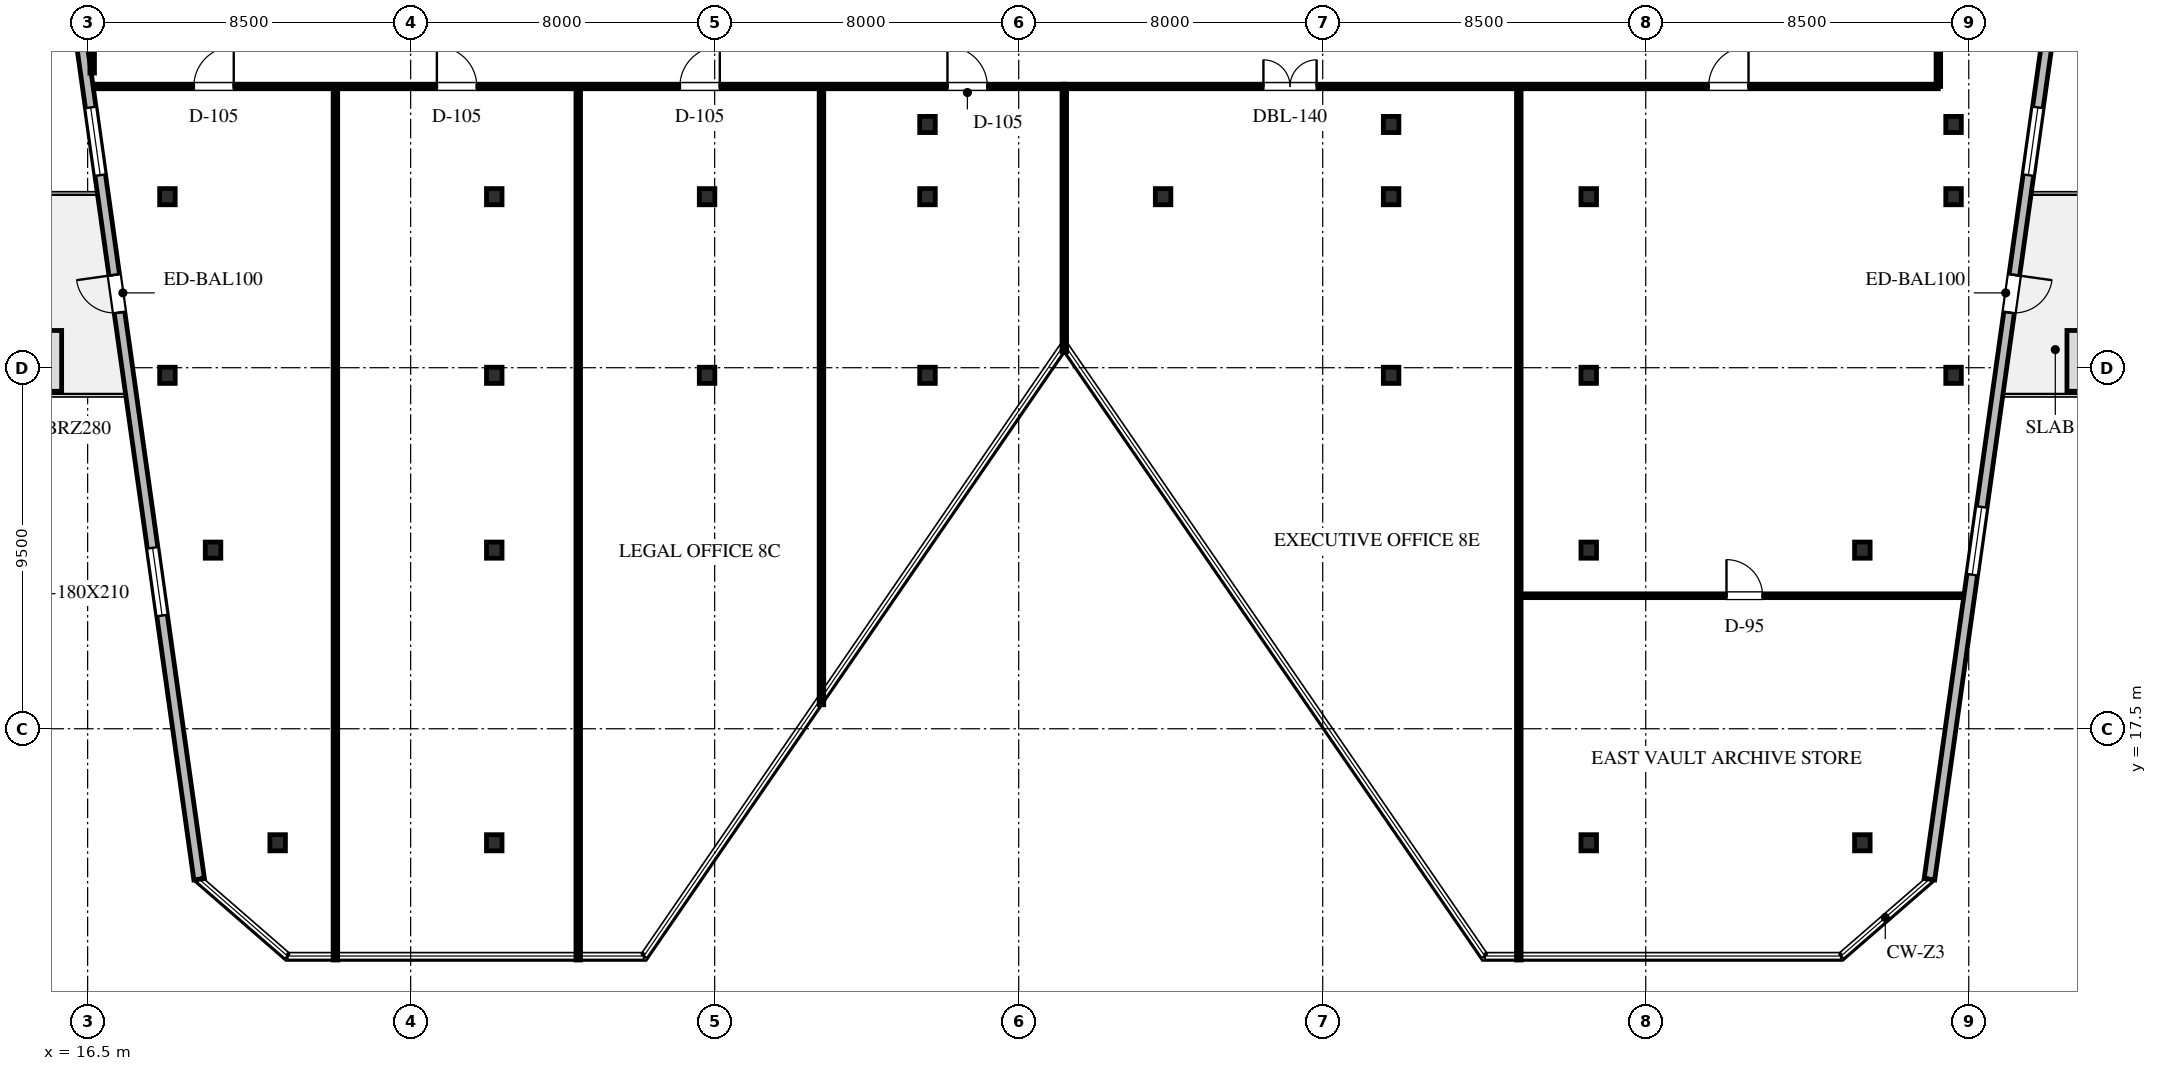
"""IFC4 building model, lengths in metres.
Left out: names, types, materials, properties, quantities, classifications, styles, units other than length and angle.
Written with IfcOpenShell. Run it as: python <this file> out.ifc"""

import sys

from ifc_helpers import new_model, si_unit, direction, frame, frame_2d, origin, origin_2d, place, context, subcontext, project, spatial, rectangle, i_section, extrude, element, fill, save


model = new_model("IFC4")
c1 = context("Model", 3, precision=1e-05, world=origin(), true_north=direction((0.0, 1.0)))
c2 = subcontext(c1, "Body", "Model", "MODEL_VIEW")
j1 = project(units=[si_unit("LENGTHUNIT", "METRE"), si_unit("PLANEANGLEUNIT", "RADIAN")], contexts=[c1])
p1 = place(None, origin())
s1 = spatial("IfcSite", under=j1, at=p1, CompositionType="ELEMENT")
p2 = place(p1, origin())
s2 = spatial("IfcBuilding", under=s1, at=p2, CompositionType="ELEMENT")
p3 = place(p2, frame((0.0, 0.0, 168.5)))
s3 = spatial("IfcBuildingStorey", under=s2, at=p3, CompositionType="ELEMENT", Elevation=168.5)
for number, where, z_axis, x_axis in (
    (1, (21.5, 14.5, 0.0), (0.0, 0.0, 1.0), (1.0, 0.0, 0.0)),
    (2, (18.6, 26.8, 0.0), (0.0, 0.0, 1.0), (1.0, 0.0, 0.0)),
    (3, (27.2, 26.8, 0.0), (0.0, 0.0, 1.0), (1.0, 0.0, 0.0)),
    (4, (32.8, 26.8, 0.0), (0.0, 0.0, 1.0), (1.0, 0.0, 0.0)),
    (5, (38.6, 26.8, 0.0), (0.0, 0.0, 1.0), (1.0, 0.0, 0.0)),
    (6, (50.8, 26.8, 0.0), (0.0, 0.0, 1.0), (1.0, 0.0, 0.0)),
    (7, (56.0, 26.8, 0.0), (0.0, 0.0, 1.0), (1.0, 0.0, 0.0)),
    (8, (65.6, 26.8, 0.0), (0.0, 0.0, 1.0), (1.0, 0.0, 0.0)),
    (9, (18.6, 31.5, 0.0), (0.0, 0.0, 1.0), (1.0, 0.0, 0.0)),
    (10, (27.2, 31.5, 0.0), (0.0, 0.0, 1.0), (1.0, 0.0, 0.0)),
    (11, (32.8, 31.5, 0.0), (0.0, 0.0, 1.0), (1.0, 0.0, 0.0)),
    (12, (27.2, 14.5, 0.0), (0.0, 0.0, 1.0), (1.0, 0.0, 0.0)),
    (13, (38.6, 31.5, 0.0), (0.0, 0.0, 1.0), (1.0, 0.0, 0.0)),
    (14, (44.8, 31.5, 0.0), (0.0, 0.0, 1.0), (1.0, 0.0, 0.0)),
    (15, (50.8, 31.5, 0.0), (0.0, 0.0, 1.0), (1.0, 0.0, 0.0)),
    (16, (56.0, 31.5, 0.0), (0.0, 0.0, 1.0), (1.0, 0.0, 0.0)),
    (17, (65.6, 31.5, 0.0), (0.0, 0.0, 1.0), (1.0, 0.0, 0.0)),
    (18, (56.0, 14.5, 0.0), (0.0, 0.0, 1.0), (1.0, 0.0, 0.0)),
    (19, (63.2, 14.5, 0.0), (0.0, 0.0, 1.0), (1.0, 0.0, 0.0)),
    (20, (19.8, 22.2, 0.0), (0.0, 0.0, 1.0), (1.0, 0.0, 0.0)),
    (21, (27.2, 22.2, 0.0), (0.0, 0.0, 1.0), (1.0, 0.0, 0.0)),
    (22, (56.0, 22.2, 0.0), (0.0, 0.0, 1.0), (1.0, 0.0, 0.0)),
    (23, (63.2, 22.2, 0.0), (0.0, 0.0, 1.0), (1.0, 0.0, 0.0)),
    (24, (38.6, 33.4, 0.0), (0.0, 0.0, 1.0), (1.0, 0.0, 0.0)),
    (25, (50.8, 33.4, 0.0), (0.0, 0.0, 1.0), (1.0, 0.0, 0.0)),
    (26, (65.6, 33.4, 0.0), (0.0, 0.0, 1.0), (1.0, 0.0, 0.0)),
):
    element("IfcColumn", number, at=place(p3, frame(where, z_axis=z_axis, x_axis=x_axis)), inside=s3, PredefinedType="COLUMN", context=c2, shape_type="SweptSolid", body=[
        extrude(i_section(OverallWidth=0.409, OverallDepth=0.425, WebThickness=0.033, FlangeThickness=0.052, FilletRadius=0.03, at=origin_2d()), origin(), (0.0, 0.0, 1.0), 4.0),
    ])
p4 = place(p3, frame((19.434, 13.541, 0.0), z_axis=(0.0, 0.0, 1.0), x_axis=(-0.139173290738, 0.99026804207, 0.0)))
e27 = element("IfcWall", 27, at=p4, inside=s3, PredefinedType="STANDARD", context=c2, shape_type="SweptSolid", body=[
    extrude(rectangle(XDim=24.498, YDim=0.28, at=frame_2d((12.249, 0.0))), origin(), (0.0, 0.0, 1.0), 3.755),
])
p5 = place(p4, frame((15.057, 0.0, 0.0)))
e28 = element("IfcOpeningElement", 28, at=p5, cuts=e27, PredefinedType="OPENING", context=c2, shape_type="SweptSolid", body=[
    extrude(rectangle(XDim=1.0, YDim=2.15, at=frame_2d((0.5, 1.075))), frame((0.0, 0.15, 0.0), z_axis=(0.0, -1.0, 0.0), x_axis=(1.0, 0.0, 0.0)), (0.0, 0.0, 1.0), 0.3),
])
p6 = place(p4, frame((7.006, 0.0, 0.65)))
e29 = element("IfcOpeningElement", 29, at=p6, cuts=e27, PredefinedType="OPENING", context=c2, shape_type="SweptSolid", body=[
    extrude(rectangle(XDim=1.8, YDim=2.1, at=frame_2d((0.9, 1.05))), frame((0.0, 0.15, 0.0), z_axis=(0.0, -1.0, 0.0), x_axis=(1.0, 0.0, 0.0)), (0.0, 0.0, 1.0), 0.3),
])
p7 = place(p4, frame((18.708, 0.0, 0.65)))
e30 = element("IfcOpeningElement", 30, at=p7, cuts=e27, PredefinedType="OPENING", context=c2, shape_type="SweptSolid", body=[
    extrude(rectangle(XDim=1.8, YDim=2.1, at=frame_2d((0.9, 1.05))), frame((0.0, 0.15, 0.0), z_axis=(0.0, -1.0, 0.0), x_axis=(1.0, 0.0, 0.0)), (0.0, 0.0, 1.0), 0.3),
])
p8 = place(p3, frame((68.375, 37.8, 0.0), z_axis=(0.0, 0.0, 1.0), x_axis=(-0.139173290738, -0.99026804207, 0.0)))
e31 = element("IfcWall", 31, at=p8, inside=s3, PredefinedType="STANDARD", context=c2, shape_type="SweptSolid", body=[
    extrude(rectangle(XDim=24.498, YDim=0.28, at=frame_2d((12.249, 0.0))), origin(), (0.0, 0.0, 1.0), 3.755),
])
p9 = place(p8, frame((8.44, 0.0, 0.0)))
e32 = element("IfcOpeningElement", 32, at=p9, cuts=e31, PredefinedType="OPENING", context=c2, shape_type="SweptSolid", body=[
    extrude(rectangle(XDim=1.0, YDim=2.15, at=frame_2d((0.5, 1.075))), frame((0.0, 0.15, 0.0), z_axis=(0.0, -1.0, 0.0), x_axis=(1.0, 0.0, 0.0)), (0.0, 0.0, 1.0), 0.3),
])
p10 = place(p8, frame((3.99, 0.0, 0.65)))
e33 = element("IfcOpeningElement", 33, at=p10, cuts=e31, PredefinedType="OPENING", context=c2, shape_type="SweptSolid", body=[
    extrude(rectangle(XDim=1.8, YDim=2.1, at=frame_2d((0.9, 1.05))), frame((0.0, 0.15, 0.0), z_axis=(0.0, -1.0, 0.0), x_axis=(1.0, 0.0, 0.0)), (0.0, 0.0, 1.0), 0.3),
])
p11 = place(p8, frame((14.606, 0.0, 0.65)))
e34 = element("IfcOpeningElement", 34, at=p11, cuts=e31, PredefinedType="OPENING", context=c2, shape_type="SweptSolid", body=[
    extrude(rectangle(XDim=1.8, YDim=2.1, at=frame_2d((0.9, 1.05))), frame((0.0, 0.15, 0.0), z_axis=(0.0, -1.0, 0.0), x_axis=(1.0, 0.0, 0.0)), (0.0, 0.0, 1.0), 0.3),
])
p12 = place(p3, frame((16.669, 34.4, 0.0), z_axis=(0.0, 0.0, 1.0), x_axis=(1.0, 0.0, 0.0)))
e35 = element("IfcWall", 35, at=p12, inside=s3, PredefinedType="PARTITIONING", context=c2, shape_type="SweptSolid", body=[
    extrude(rectangle(XDim=25.531, YDim=0.12, at=frame_2d((12.765, 0.0))), origin(), (0.0, 0.0, 1.0), 2.982),
])
p13 = place(p12, frame((2.625, 0.0, 0.0)))
e36 = element("IfcOpeningElement", 36, at=p13, cuts=e35, PredefinedType="OPENING", context=c2, shape_type="SweptSolid", body=[
    extrude(rectangle(XDim=1.05, YDim=2.2, at=frame_2d((0.525, 1.1))), frame((0.0, 0.07, 0.0), z_axis=(0.0, -1.0, 0.0), x_axis=(1.0, 0.0, 0.0)), (0.0, 0.0, 1.0), 0.14),
])
p14 = place(p12, frame((9.021, 0.0, 0.0)))
e37 = element("IfcOpeningElement", 37, at=p14, cuts=e35, PredefinedType="OPENING", context=c2, shape_type="SweptSolid", body=[
    extrude(rectangle(XDim=1.05, YDim=2.2, at=frame_2d((0.525, 1.1))), frame((0.0, 0.07, 0.0), z_axis=(0.0, -1.0, 0.0), x_axis=(1.0, 0.0, 0.0)), (0.0, 0.0, 1.0), 0.14),
])
p15 = place(p12, frame((15.416, 0.0, 0.0)))
e38 = element("IfcOpeningElement", 38, at=p15, cuts=e35, PredefinedType="OPENING", context=c2, shape_type="SweptSolid", body=[
    extrude(rectangle(XDim=1.05, YDim=2.2, at=frame_2d((0.525, 1.1))), frame((0.0, 0.07, 0.0), z_axis=(0.0, -1.0, 0.0), x_axis=(1.0, 0.0, 0.0)), (0.0, 0.0, 1.0), 0.14),
])
p16 = place(p12, frame((22.456, 0.0, 0.0)))
e39 = element("IfcOpeningElement", 39, at=p16, cuts=e35, PredefinedType="OPENING", context=c2, shape_type="SweptSolid", body=[
    extrude(rectangle(XDim=1.05, YDim=2.2, at=frame_2d((0.525, 1.1))), frame((0.0, 0.07, 0.0), z_axis=(0.0, -1.0, 0.0), x_axis=(1.0, 0.0, 0.0)), (0.0, 0.0, 1.0), 0.14),
])
p17 = place(p3, frame((42.2, 34.4, 0.0), z_axis=(0.0, 0.0, 1.0), x_axis=(1.0, 0.0, 0.0)))
e40 = element("IfcWall", 40, at=p17, inside=s3, PredefinedType="PARTITIONING", context=c2, shape_type="SweptSolid", body=[
    extrude(rectangle(XDim=23.0, YDim=0.12, at=frame_2d((11.5, 0.0))), origin(), (0.0, 0.0, 1.0), 2.982),
])
p18 = place(p17, frame((5.24, 0.0, 0.0)))
e41 = element("IfcOpeningElement", 41, at=p18, cuts=e40, PredefinedType="OPENING", context=c2, shape_type="SweptSolid", body=[
    extrude(rectangle(XDim=1.4, YDim=2.2, at=frame_2d((0.7, 1.1))), frame((0.0, 0.07, 0.0), z_axis=(0.0, -1.0, 0.0), x_axis=(1.0, 0.0, 0.0)), (0.0, 0.0, 1.0), 0.14),
])
p19 = place(p17, frame((16.955, 0.0, 0.0)))
e42 = element("IfcOpeningElement", 42, at=p19, cuts=e40, PredefinedType="OPENING", context=c2, shape_type="SweptSolid", body=[
    extrude(rectangle(XDim=1.05, YDim=2.2, at=frame_2d((0.525, 1.1))), frame((0.0, 0.07, 0.0), z_axis=(0.0, -1.0, 0.0), x_axis=(1.0, 0.0, 0.0)), (0.0, 0.0, 1.0), 0.14),
])
p20 = place(p3, frame((16.62, 34.752, 0.0), z_axis=(0.0, 0.0, 1.0), x_axis=(0.0, 1.0, 0.0)))
e43 = element("IfcWall", 43, at=p20, inside=s3, PredefinedType="PARTITIONING", context=c2, shape_type="SweptSolid", body=[
    extrude(rectangle(XDim=3.298, YDim=0.12, at=frame_2d((1.649, 0.0))), origin(), (0.0, 0.0, 1.0), 3.755),
])
p21 = place(p3, frame((65.2, 34.4, 0.0), z_axis=(0.0, 0.0, 1.0), x_axis=(0.0, 1.0, 0.0)))
e44 = element("IfcWall", 44, at=p21, inside=s3, PredefinedType="PARTITIONING", context=c2, shape_type="SweptSolid", body=[
    extrude(rectangle(XDim=3.317, YDim=0.12, at=frame_2d((1.659, 0.0))), origin(), (0.0, 0.0, 1.0), 2.982),
])
p22 = place(p3, frame((42.2, 27.427, 0.0), z_axis=(0.0, 0.0, 1.0), x_axis=(0.0, 1.0, 0.0)))
e45 = element("IfcWall", 45, at=p22, inside=s3, PredefinedType="PARTITIONING", context=c2, shape_type="SweptSolid", body=[
    extrude(rectangle(XDim=6.973, YDim=0.12, at=frame_2d((3.487, 0.0))), origin(), (0.0, 0.0, 1.0), 2.982),
])
for number, where, z_axis, x_axis in (
    (46, (23.02, 11.415, 0.0), (0.0, 0.0, 1.0), (0.0, 1.0, 0.0)),
    (47, (29.41, 11.415, 0.0), (0.0, 0.0, 1.0), (0.0, 1.0, 0.0)),
):
    element("IfcWall", number, at=place(p3, frame(where, z_axis=z_axis, x_axis=x_axis)), inside=s3, PredefinedType="PARTITIONING", context=c2, shape_type="SweptSolid", body=[
        extrude(rectangle(XDim=22.917, YDim=0.12, at=frame_2d((11.458, 0.0))), origin(), (0.0, 0.0, 1.0), 2.982),
    ])
p23 = place(p3, frame((35.81, 18.132, 0.0), z_axis=(0.0, 0.0, 1.0), x_axis=(0.0, 1.0, 0.0)))
e48 = element("IfcWall", 48, at=p23, inside=s3, PredefinedType="PARTITIONING", context=c2, shape_type="SweptSolid", body=[
    extrude(rectangle(XDim=16.2, YDim=0.12, at=frame_2d((8.1, 0.0))), origin(), (0.0, 0.0, 1.0), 2.982),
])
p24 = place(p3, frame((54.16, 11.415, 0.0), z_axis=(0.0, 0.0, 1.0), x_axis=(0.0, 1.0, 0.0)))
e49 = element("IfcWall", 49, at=p24, inside=s3, PredefinedType="PARTITIONING", context=c2, shape_type="SweptSolid", body=[
    extrude(rectangle(XDim=22.917, YDim=0.12, at=frame_2d((11.458, 0.0))), origin(), (0.0, 0.0, 1.0), 2.982),
])
p25 = place(p3, frame((54.228, 21.0, 0.0), z_axis=(0.0, 0.0, 1.0), x_axis=(1.0, 0.0, 0.0)))
e50 = element("IfcWall", 50, at=p25, inside=s3, PredefinedType="PARTITIONING", context=c2, shape_type="SweptSolid", body=[
    extrude(rectangle(XDim=11.619, YDim=0.1, at=frame_2d((5.81, 0.0))), origin(), (0.0, 0.0, 1.0), 2.982),
])
p26 = place(p25, frame((5.397, 0.0, 0.0)))
e51 = element("IfcOpeningElement", 51, at=p26, cuts=e50, PredefinedType="OPENING", context=c2, shape_type="SweptSolid", body=[
    extrude(rectangle(XDim=0.95, YDim=2.15, at=frame_2d((0.475, 1.075))), frame((0.0, 0.06, 0.0), z_axis=(0.0, -1.0, 0.0), x_axis=(1.0, 0.0, 0.0)), (0.0, 0.0, 1.0), 0.12),
])
p27 = place(p5, origin())
e52 = element("IfcDoor", 52, at=p27, inside=s3, OperationType="SINGLE_SWING_RIGHT", PredefinedType="DOOR", context=c2, shape_type="SweptSolid", body=[
    extrude(rectangle(XDim=1.0, YDim=2.15, at=frame_2d((0.5, 1.075))), frame((0.0, 0.025, 0.0), z_axis=(0.0, -1.0, 0.0), x_axis=(1.0, 0.0, 0.0)), (0.0, 0.0, 1.0), 0.05),
])
fill(e28, e52)
p28 = place(p6, origin())
e53 = element("IfcWindow", 53, at=p28, inside=s3, PartitioningType="SINGLE_PANEL", PredefinedType="WINDOW", context=c2, shape_type="SweptSolid", body=[
    extrude(rectangle(XDim=1.8, YDim=2.1, at=frame_2d((0.9, 1.05))), frame((0.0, 0.03, 0.0), z_axis=(0.0, -1.0, 0.0), x_axis=(1.0, 0.0, 0.0)), (0.0, 0.0, 1.0), 0.06),
])
fill(e29, e53)
p29 = place(p7, origin())
e54 = element("IfcWindow", 54, at=p29, inside=s3, PartitioningType="SINGLE_PANEL", PredefinedType="WINDOW", context=c2, shape_type="SweptSolid", body=[
    extrude(rectangle(XDim=1.8, YDim=2.1, at=frame_2d((0.9, 1.05))), frame((0.0, 0.03, 0.0), z_axis=(0.0, -1.0, 0.0), x_axis=(1.0, 0.0, 0.0)), (0.0, 0.0, 1.0), 0.06),
])
fill(e30, e54)
p30 = place(p9, origin())
e55 = element("IfcDoor", 55, at=p30, inside=s3, OperationType="SINGLE_SWING_LEFT", PredefinedType="DOOR", context=c2, shape_type="SweptSolid", body=[
    extrude(rectangle(XDim=1.0, YDim=2.15, at=frame_2d((0.5, 1.075))), frame((0.0, 0.025, 0.0), z_axis=(0.0, -1.0, 0.0), x_axis=(1.0, 0.0, 0.0)), (0.0, 0.0, 1.0), 0.05),
])
fill(e32, e55)
p31 = place(p10, origin())
e56 = element("IfcWindow", 56, at=p31, inside=s3, PartitioningType="SINGLE_PANEL", PredefinedType="WINDOW", context=c2, shape_type="SweptSolid", body=[
    extrude(rectangle(XDim=1.8, YDim=2.1, at=frame_2d((0.9, 1.05))), frame((0.0, 0.03, 0.0), z_axis=(0.0, -1.0, 0.0), x_axis=(1.0, 0.0, 0.0)), (0.0, 0.0, 1.0), 0.06),
])
fill(e33, e56)
p32 = place(p11, origin())
e57 = element("IfcWindow", 57, at=p32, inside=s3, PartitioningType="SINGLE_PANEL", PredefinedType="WINDOW", context=c2, shape_type="SweptSolid", body=[
    extrude(rectangle(XDim=1.8, YDim=2.1, at=frame_2d((0.9, 1.05))), frame((0.0, 0.03, 0.0), z_axis=(0.0, -1.0, 0.0), x_axis=(1.0, 0.0, 0.0)), (0.0, 0.0, 1.0), 0.06),
])
fill(e34, e57)
p33 = place(p13, origin())
e58 = element("IfcDoor", 58, at=p33, inside=s3, OperationType="SINGLE_SWING_RIGHT", PredefinedType="DOOR", context=c2, shape_type="SweptSolid", body=[
    extrude(rectangle(XDim=1.05, YDim=2.2, at=frame_2d((0.525, 1.1))), frame((0.0, 0.025, 0.0), z_axis=(0.0, -1.0, 0.0), x_axis=(1.0, 0.0, 0.0)), (0.0, 0.0, 1.0), 0.05),
])
fill(e36, e58)
p34 = place(p14, origin())
e59 = element("IfcDoor", 59, at=p34, inside=s3, OperationType="SINGLE_SWING_LEFT", PredefinedType="DOOR", context=c2, shape_type="SweptSolid", body=[
    extrude(rectangle(XDim=1.05, YDim=2.2, at=frame_2d((0.525, 1.1))), frame((0.0, 0.025, 0.0), z_axis=(0.0, -1.0, 0.0), x_axis=(1.0, 0.0, 0.0)), (0.0, 0.0, 1.0), 0.05),
])
fill(e37, e59)
p35 = place(p15, origin())
e60 = element("IfcDoor", 60, at=p35, inside=s3, OperationType="SINGLE_SWING_RIGHT", PredefinedType="DOOR", context=c2, shape_type="SweptSolid", body=[
    extrude(rectangle(XDim=1.05, YDim=2.2, at=frame_2d((0.525, 1.1))), frame((0.0, 0.025, 0.0), z_axis=(0.0, -1.0, 0.0), x_axis=(1.0, 0.0, 0.0)), (0.0, 0.0, 1.0), 0.05),
])
fill(e38, e60)
p36 = place(p16, origin())
e61 = element("IfcDoor", 61, at=p36, inside=s3, OperationType="SINGLE_SWING_LEFT", PredefinedType="DOOR", context=c2, shape_type="SweptSolid", body=[
    extrude(rectangle(XDim=1.05, YDim=2.2, at=frame_2d((0.525, 1.1))), frame((0.0, 0.025, 0.0), z_axis=(0.0, -1.0, 0.0), x_axis=(1.0, 0.0, 0.0)), (0.0, 0.0, 1.0), 0.05),
])
fill(e39, e61)
p37 = place(p18, origin())
e62 = element("IfcDoor", 62, at=p37, inside=s3, OperationType="DOUBLE_DOOR_SINGLE_SWING", PredefinedType="DOOR", context=c2, shape_type="SweptSolid", body=[
    extrude(rectangle(XDim=1.4, YDim=2.2, at=frame_2d((0.7, 1.1))), frame((0.0, 0.025, 0.0), z_axis=(0.0, -1.0, 0.0), x_axis=(1.0, 0.0, 0.0)), (0.0, 0.0, 1.0), 0.05),
])
fill(e41, e62)
p38 = place(p19, origin())
e63 = element("IfcDoor", 63, at=p38, inside=s3, OperationType="SINGLE_SWING_RIGHT", PredefinedType="DOOR", context=c2, shape_type="SweptSolid", body=[
    extrude(rectangle(XDim=1.05, YDim=2.2, at=frame_2d((0.525, 1.1))), frame((0.0, 0.025, 0.0), z_axis=(0.0, -1.0, 0.0), x_axis=(1.0, 0.0, 0.0)), (0.0, 0.0, 1.0), 0.05),
])
fill(e42, e63)
p39 = place(p26, origin())
e64 = element("IfcDoor", 64, at=p39, inside=s3, OperationType="SINGLE_SWING_LEFT", PredefinedType="DOOR", context=c2, shape_type="SweptSolid", body=[
    extrude(rectangle(XDim=0.95, YDim=2.15, at=frame_2d((0.475, 1.075))), frame((0.0, 0.025, 0.0), z_axis=(0.0, -1.0, 0.0), x_axis=(1.0, 0.0, 0.0)), (0.0, 0.0, 1.0), 0.05),
])
fill(e51, e64)
save(model, sys.argv[1])
